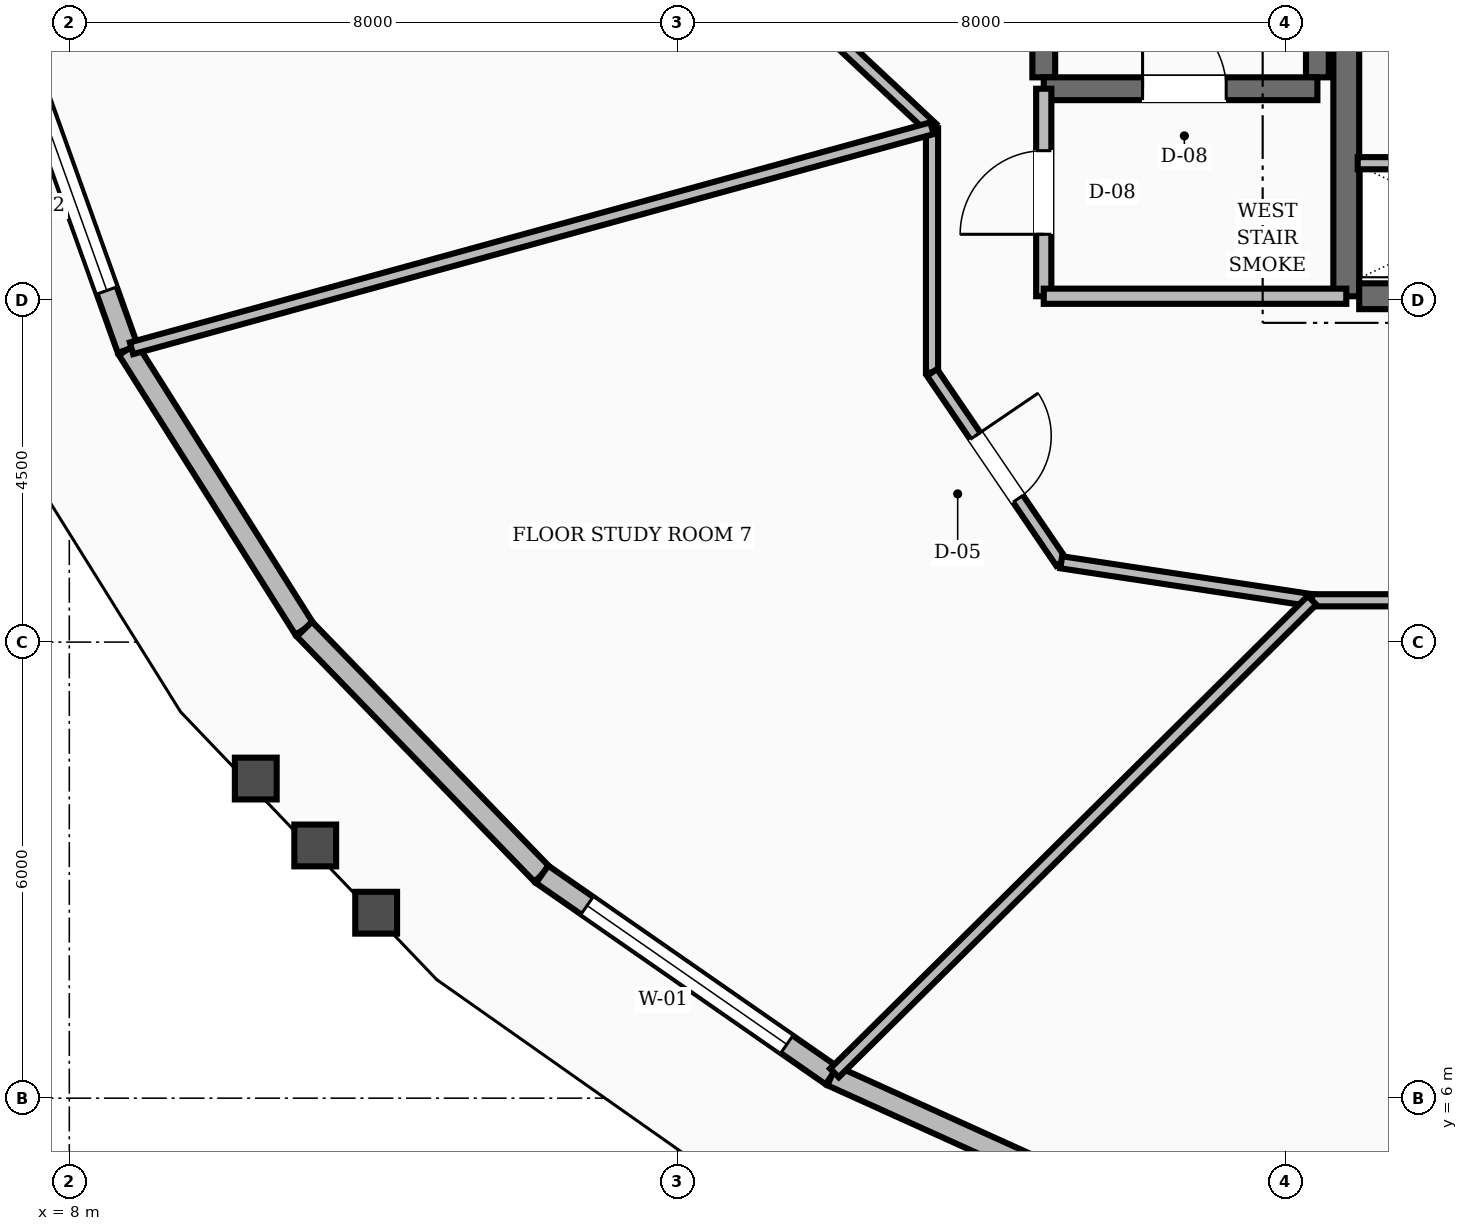
"""IFC4 building model, lengths in metres.
Left out: names, types, materials, properties, quantities, classifications, styles, units other than length and angle.
Written with IfcOpenShell. Run it as: python <this file> out.ifc"""

import sys

from ifc_helpers import new_model, si_unit, direction, frame, frame_2d, origin, place, context, subcontext, project, spatial, rectangle, extrude, element, fill, save


model = new_model("IFC4")
c1 = context("Model", 3, precision=1e-05, world=origin(), true_north=direction((0.0, 1.0)))
c2 = subcontext(c1, "Body", "Model", "MODEL_VIEW")
j1 = project(units=[si_unit("LENGTHUNIT", "METRE"), si_unit("PLANEANGLEUNIT", "RADIAN")], contexts=[c1])
p1 = place(None, origin())
s1 = spatial("IfcSite", under=j1, at=p1, CompositionType="ELEMENT")
p2 = place(p1, origin())
s2 = spatial("IfcBuilding", under=s1, at=p2, CompositionType="ELEMENT")
p3 = place(p2, frame((0.0, 0.0, 189.2)))
s3 = spatial("IfcBuildingStorey", under=s2, at=p3, CompositionType="ELEMENT", Elevation=189.2)
p4 = place(p3, frame((24.8, 16.55, 0.0), z_axis=(0.0, 0.0, 1.0), x_axis=(0.0, 1.0, 0.0)))
e1 = element("IfcWall", 1, at=p4, inside=s3, PredefinedType="SHEAR", context=c2, shape_type="SweptSolid", body=[
    extrude(rectangle(XDim=6.3, YDim=0.34, at=frame_2d((3.15, 0.0))), origin(), (0.0, 0.0, 1.0), 3.6),
])
p5 = place(p3, frame((24.97, 16.55, 0.0), z_axis=(0.0, 0.0, 1.0), x_axis=(1.0, 0.0, 0.0)))
e2 = element("IfcWall", 2, at=p5, inside=s3, PredefinedType="SHEAR", context=c2, shape_type="SweptSolid", body=[
    extrude(rectangle(XDim=3.23, YDim=0.34, at=frame_2d((1.615, 0.0))), origin(), (0.0, 0.0, 1.0), 3.6),
])
for number, where, z_axis, x_axis in (
    (3, (20.82, 19.43, 0.0), (0.0, 0.0, 1.0), (0.0, 1.0, 0.0)),
    (4, (24.42, 19.43, 0.0), (0.0, 0.0, 1.0), (0.0, 1.0, 0.0)),
):
    element("IfcWall", number, at=place(p3, frame(where, z_axis=z_axis, x_axis=x_axis)), inside=s3, PredefinedType="SHEAR", context=c2, shape_type="SweptSolid", body=[
        extrude(rectangle(XDim=8.74, YDim=0.3, at=frame_2d((4.37, 0.0))), origin(), (0.0, 0.0, 1.0), 3.6),
    ])
p6 = place(p3, frame((20.82, 19.28, 0.0), z_axis=(0.0, 0.0, 1.0), x_axis=(1.0, 0.0, 0.0)))
e5 = element("IfcWall", 5, at=p6, inside=s3, PredefinedType="SHEAR", context=c2, shape_type="SweptSolid", body=[
    extrude(rectangle(XDim=3.6, YDim=0.3, at=frame_2d((1.8, 0.0))), origin(), (0.0, 0.0, 1.0), 3.6),
])
p7 = place(p6, frame((1.3, 0.0, 0.0)))
e6 = element("IfcOpeningElement", 6, at=p7, cuts=e5, PredefinedType="OPENING", context=c2, shape_type="SweptSolid", body=[
    extrude(rectangle(XDim=1.1, YDim=2.1, at=frame_2d((0.55, 1.05))), frame((0.0, 0.16, 0.0), z_axis=(0.0, -1.0, 0.0), x_axis=(1.0, 0.0, 0.0)), (0.0, 0.0, 1.0), 0.32),
])
p8 = place(p3, frame((7.339, 19.846, 0.0), z_axis=(0.0, 0.0, 1.0), x_axis=(0.337262137127, -0.941410776898, 0.0)))
e7 = element("IfcWall", 7, at=p8, inside=s3, PredefinedType="STANDARD", context=c2, shape_type="SweptSolid", body=[
    extrude(rectangle(XDim=4.243, YDim=0.28, at=frame_2d((2.121, 0.0))), origin(), (0.0, 0.0, 1.0), 2.82),
])
p9 = place(p8, frame((0.821, 0.0, 0.8)))
e8 = element("IfcOpeningElement", 8, at=p9, cuts=e7, PredefinedType="OPENING", context=c2, shape_type="SweptSolid", body=[
    extrude(rectangle(XDim=2.6, YDim=1.65, at=frame_2d((1.3, 0.825))), frame((0.0, 0.15, 0.0), z_axis=(0.0, -1.0, 0.0), x_axis=(1.0, 0.0, 0.0)), (0.0, 0.0, 1.0), 0.3),
])
p10 = place(p3, frame((8.77, 15.852, 0.0), z_axis=(0.0, 0.0, 1.0), x_axis=(0.533779843876, -0.845623484934, 0.0)))
e9 = element("IfcWall", 9, at=p10, inside=s3, PredefinedType="STANDARD", context=c2, shape_type="SweptSolid", body=[
    extrude(rectangle(XDim=4.353, YDim=0.28, at=frame_2d((2.176, 0.0))), origin(), (0.0, 0.0, 1.0), 2.82),
])
p11 = place(p3, frame((11.094, 12.171, 0.0), z_axis=(0.0, 0.0, 1.0), x_axis=(0.695935353848, -0.718104437575, 0.0)))
e10 = element("IfcWall", 10, at=p11, inside=s3, PredefinedType="STANDARD", context=c2, shape_type="SweptSolid", body=[
    extrude(rectangle(XDim=4.493, YDim=0.28, at=frame_2d((2.247, 0.0))), origin(), (0.0, 0.0, 1.0), 2.82),
])
p12 = place(p3, frame((14.22, 8.945, 0.0), z_axis=(0.0, 0.0, 1.0), x_axis=(0.821202162047, -0.570637370885, 0.0)))
e11 = element("IfcWall", 11, at=p12, inside=s3, PredefinedType="STANDARD", context=c2, shape_type="SweptSolid", body=[
    extrude(rectangle(XDim=4.64, YDim=0.28, at=frame_2d((2.32, 0.0))), origin(), (0.0, 0.0, 1.0), 2.82),
])
p13 = place(p12, frame((0.72, 0.0, 0.8)))
e12 = element("IfcOpeningElement", 12, at=p13, cuts=e11, PredefinedType="OPENING", context=c2, shape_type="SweptSolid", body=[
    extrude(rectangle(XDim=3.2, YDim=1.65, at=frame_2d((1.6, 0.825))), frame((0.0, 0.15, 0.0), z_axis=(0.0, -1.0, 0.0), x_axis=(1.0, 0.0, 0.0)), (0.0, 0.0, 1.0), 0.3),
])
p14 = place(p3, frame((18.031, 6.297, 0.0), z_axis=(0.0, 0.0, 1.0), x_axis=(0.911004961114, -0.412395393798, 0.0)))
e13 = element("IfcWall", 13, at=p14, inside=s3, PredefinedType="STANDARD", context=c2, shape_type="SweptSolid", body=[
    extrude(rectangle(XDim=4.771, YDim=0.28, at=frame_2d((2.386, 0.0))), origin(), (0.0, 0.0, 1.0), 2.82),
])
p15 = place(p3, frame((20.82, 16.55, 0.0), z_axis=(0.0, 0.0, 1.0), x_axis=(0.0, 1.0, 0.0)))
e14 = element("IfcWall", 14, at=p15, inside=s3, PredefinedType="SOLIDWALL", context=c2, shape_type="SweptSolid", body=[
    extrude(rectangle(XDim=2.73, YDim=0.2, at=frame_2d((1.365, 0.0))), origin(), (0.0, 0.0, 1.0), 2.8),
])
p16 = place(p15, frame((0.815, 0.0, 0.0)))
e15 = element("IfcOpeningElement", 15, at=p16, cuts=e14, PredefinedType="OPENING", context=c2, shape_type="SweptSolid", body=[
    extrude(rectangle(XDim=1.1, YDim=2.1, at=frame_2d((0.55, 1.05))), frame((0.0, 0.11, 0.0), z_axis=(0.0, -1.0, 0.0), x_axis=(1.0, 0.0, 0.0)), (0.0, 0.0, 1.0), 0.22),
])
p17 = place(p3, frame((20.82, 16.55, 0.0), z_axis=(0.0, 0.0, 1.0), x_axis=(1.0, 0.0, 0.0)))
e16 = element("IfcWall", 16, at=p17, inside=s3, PredefinedType="SOLIDWALL", context=c2, shape_type="SweptSolid", body=[
    extrude(rectangle(XDim=3.98, YDim=0.2, at=frame_2d((1.99, 0.0))), origin(), (0.0, 0.0, 1.0), 2.8),
])
p18 = place(p3, frame((24.95, 18.3, 0.0), z_axis=(0.0, 0.0, 1.0), x_axis=(1.0, 0.0, 0.0)))
e17 = element("IfcWall", 17, at=p18, inside=s3, PredefinedType="SOLIDWALL", context=c2, shape_type="SweptSolid", body=[
    extrude(rectangle(XDim=3.2, YDim=0.16, at=frame_2d((1.6, 0.0))), origin(), (0.0, 0.0, 1.0), 2.8),
])
p19 = place(p3, frame((16.95, 21.006, 0.0), z_axis=(0.0, 0.0, 1.0), x_axis=(0.730150682073, -0.683286163674, 0.0)))
e18 = element("IfcWall", 18, at=p19, inside=s3, PredefinedType="SOLIDWALL", context=c2, shape_type="SweptSolid", body=[
    extrude(rectangle(XDim=3.287, YDim=0.16, at=frame_2d((1.644, 0.0))), origin(), (0.0, 0.0, 1.0), 2.8),
])
p20 = place(p3, frame((19.35, 18.76, 0.0), z_axis=(0.0, 0.0, 1.0), x_axis=(0.0, -1.0, 0.0)))
e19 = element("IfcWall", 19, at=p20, inside=s3, PredefinedType="SOLIDWALL", context=c2, shape_type="SweptSolid", body=[
    extrude(rectangle(XDim=3.213, YDim=0.16, at=frame_2d((1.606, 0.0))), origin(), (0.0, 0.0, 1.0), 2.8),
])
p21 = place(p3, frame((19.35, 15.548, 0.0), z_axis=(0.0, 0.0, 1.0), x_axis=(0.562674669208, -0.826678423955, 0.0)))
e20 = element("IfcWall", 20, at=p21, inside=s3, PredefinedType="SOLIDWALL", context=c2, shape_type="SweptSolid", body=[
    extrude(rectangle(XDim=3.021, YDim=0.16, at=frame_2d((1.511, 0.0))), origin(), (0.0, 0.0, 1.0), 2.8),
])
p22 = place(p21, frame((1.01, 0.0, 0.0)))
e21 = element("IfcOpeningElement", 21, at=p22, cuts=e20, PredefinedType="OPENING", context=c2, shape_type="SweptSolid", body=[
    extrude(rectangle(XDim=1.0, YDim=2.1, at=frame_2d((0.5, 1.05))), frame((0.0, 0.09, 0.0), z_axis=(0.0, -1.0, 0.0), x_axis=(1.0, 0.0, 0.0)), (0.0, 0.0, 1.0), 0.18),
])
p23 = place(p3, frame((21.05, 13.05, 0.0), z_axis=(0.0, 0.0, 1.0), x_axis=(0.988710906508, -0.149835721217, 0.0)))
e22 = element("IfcWall", 22, at=p23, inside=s3, PredefinedType="SOLIDWALL", context=c2, shape_type="SweptSolid", body=[
    extrude(rectangle(XDim=3.337, YDim=0.16, at=frame_2d((1.668, 0.0))), origin(), (0.0, 0.0, 1.0), 2.8),
])
p24 = place(p3, frame((24.349, 12.55, 0.0), z_axis=(0.0, 0.0, 1.0), x_axis=(1.0, 0.0, 0.0)))
e23 = element("IfcWall", 23, at=p24, inside=s3, PredefinedType="SOLIDWALL", context=c2, shape_type="SweptSolid", body=[
    extrude(rectangle(XDim=2.908, YDim=0.16, at=frame_2d((1.454, 0.0))), origin(), (0.0, 0.0, 1.0), 2.8),
])
p25 = place(p3, frame((19.35, 18.76, 0.0), z_axis=(0.0, 0.0, 1.0), x_axis=(-0.964240957632, -0.265027122433, 0.0)))
e24 = element("IfcWall", 24, at=p25, inside=s3, PredefinedType="SOLIDWALL", context=c2, shape_type="SweptSolid", body=[
    extrude(rectangle(XDim=10.923, YDim=0.16, at=frame_2d((5.461, 0.0))), origin(), (0.0, 0.0, 1.0), 2.8),
])
p26 = place(p3, frame((24.349, 12.55, 0.0), z_axis=(0.0, 0.0, 1.0), x_axis=(-0.710784209706, -0.703410127332, 0.0)))
e25 = element("IfcWall", 25, at=p26, inside=s3, PredefinedType="SOLIDWALL", context=c2, shape_type="SweptSolid", body=[
    extrude(rectangle(XDim=8.84, YDim=0.16, at=frame_2d((4.42, 0.0))), origin(), (0.0, 0.0, 1.0), 2.8),
])
p27 = place(p9, origin())
e26 = element("IfcWindow", 26, at=p27, inside=s3, PartitioningType="SINGLE_PANEL", PredefinedType="WINDOW", context=c2, shape_type="SweptSolid", body=[
    extrude(rectangle(XDim=2.6, YDim=1.65, at=frame_2d((1.3, 0.825))), frame((0.0, 0.03, 0.0), z_axis=(0.0, -1.0, 0.0), x_axis=(1.0, 0.0, 0.0)), (0.0, 0.0, 1.0), 0.06),
])
fill(e8, e26)
p28 = place(p13, origin())
e27 = element("IfcWindow", 27, at=p28, inside=s3, PartitioningType="SINGLE_PANEL", PredefinedType="WINDOW", context=c2, shape_type="SweptSolid", body=[
    extrude(rectangle(XDim=3.2, YDim=1.65, at=frame_2d((1.6, 0.825))), frame((0.0, 0.03, 0.0), z_axis=(0.0, -1.0, 0.0), x_axis=(1.0, 0.0, 0.0)), (0.0, 0.0, 1.0), 0.06),
])
fill(e12, e27)
p29 = place(p7, origin())
e28 = element("IfcDoor", 28, at=p29, inside=s3, OperationType="SINGLE_SWING_LEFT", PredefinedType="DOOR", context=c2, shape_type="SweptSolid", body=[
    extrude(rectangle(XDim=1.1, YDim=2.1, at=frame_2d((0.55, 1.05))), frame((0.0, 0.025, 0.0), z_axis=(0.0, -1.0, 0.0), x_axis=(1.0, 0.0, 0.0)), (0.0, 0.0, 1.0), 0.05),
])
fill(e6, e28)
p30 = place(p16, origin())
e29 = element("IfcDoor", 29, at=p30, inside=s3, OperationType="SINGLE_SWING_LEFT", PredefinedType="DOOR", context=c2, shape_type="SweptSolid", body=[
    extrude(rectangle(XDim=1.1, YDim=2.1, at=frame_2d((0.55, 1.05))), frame((0.0, 0.025, 0.0), z_axis=(0.0, -1.0, 0.0), x_axis=(1.0, 0.0, 0.0)), (0.0, 0.0, 1.0), 0.05),
])
fill(e15, e29)
p31 = place(p22, origin())
e30 = element("IfcDoor", 30, at=p31, inside=s3, OperationType="SINGLE_SWING_LEFT", PredefinedType="DOOR", context=c2, shape_type="SweptSolid", body=[
    extrude(rectangle(XDim=1.0, YDim=2.1, at=frame_2d((0.5, 1.05))), frame((0.0, 0.025, 0.0), z_axis=(0.0, -1.0, 0.0), x_axis=(1.0, 0.0, 0.0)), (0.0, 0.0, 1.0), 0.05),
])
fill(e21, e30)
save(model, sys.argv[1])
